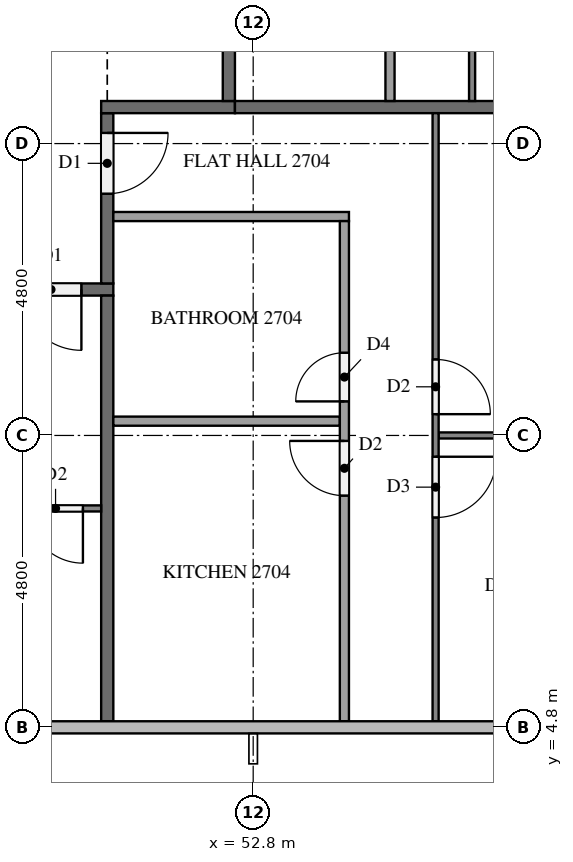
"""IFC4 building model, lengths in metres.
Left out: names, types, materials, properties, quantities, classifications, styles, units other than length and angle.
Written with IfcOpenShell. Run it as: python <this file> out.ifc"""

import sys

from ifc_helpers import new_model, si_unit, direction, frame, frame_2d, origin, place, context, subcontext, project, spatial, rectangle, extrude, element, fill, save


model = new_model("IFC4")
c1 = context("Model", 3, precision=1e-05, world=origin(), true_north=direction((0.0, 1.0)))
c2 = subcontext(c1, "Body", "Model", "MODEL_VIEW")
j1 = project(units=[si_unit("LENGTHUNIT", "METRE"), si_unit("PLANEANGLEUNIT", "RADIAN")], contexts=[c1])
p1 = place(None, origin())
s1 = spatial("IfcSite", under=j1, at=p1, CompositionType="ELEMENT")
p2 = place(p1, origin())
s2 = spatial("IfcBuilding", under=s1, at=p2, CompositionType="ELEMENT")
p3 = place(p2, frame((0.0, 0.0, 106.7)))
s3 = spatial("IfcBuildingStorey", under=s2, at=p3, CompositionType="ELEMENT", Elevation=106.7)
p4 = place(p3, frame((50.5, 12.0, 0.0), z_axis=(0.0, 0.0, 1.0), x_axis=(-1.0, 0.0, 0.0)))
e1 = element("IfcWall", 1, at=p4, inside=s3, PredefinedType="PARTITIONING", context=c2, shape_type="SweptSolid", body=[
    extrude(rectangle(XDim=38.6, YDim=0.2, at=frame_2d((19.3, 0.0))), origin(), (0.0, 0.0, 1.0), 3.2),
])
p5 = place(p4, frame((37.075, 0.0, 0.0)))
e2 = element("IfcOpeningElement", 2, at=p5, cuts=e1, PredefinedType="OPENING", context=c2, shape_type="SweptSolid", body=[
    extrude(rectangle(XDim=1.0, YDim=2.1, at=frame_2d((0.5, 1.05))), frame((0.0, 0.11, 0.0), z_axis=(0.0, -1.0, 0.0), x_axis=(1.0, 0.0, 0.0)), (0.0, 0.0, 1.0), 0.22),
])
p6 = place(p4, frame((22.675, 0.0, 0.0)))
e3 = element("IfcOpeningElement", 3, at=p6, cuts=e1, PredefinedType="OPENING", context=c2, shape_type="SweptSolid", body=[
    extrude(rectangle(XDim=1.0, YDim=2.1, at=frame_2d((0.5, 1.05))), frame((0.0, 0.11, 0.0), z_axis=(0.0, -1.0, 0.0), x_axis=(1.0, 0.0, 0.0)), (0.0, 0.0, 1.0), 0.22),
])
p7 = place(p4, frame((0.525, 0.0, 0.0)))
e4 = element("IfcOpeningElement", 4, at=p7, cuts=e1, PredefinedType="OPENING", context=c2, shape_type="SweptSolid", body=[
    extrude(rectangle(XDim=1.0, YDim=2.1, at=frame_2d((0.5, 1.05))), frame((0.0, 0.11, 0.0), z_axis=(0.0, -1.0, 0.0), x_axis=(1.0, 0.0, 0.0)), (0.0, 0.0, 1.0), 0.22),
])
p8 = place(p3, frame((50.4, 14.9, 0.0), z_axis=(0.0, 0.0, 1.0), x_axis=(0.0, -1.0, 0.0)))
e5 = element("IfcWall", 5, at=p8, inside=s3, PredefinedType="PARTITIONING", context=c2, shape_type="SweptSolid", body=[
    extrude(rectangle(XDim=2.8, YDim=0.2, at=frame_2d((1.4, 0.0))), origin(), (0.0, 0.0, 1.0), 3.2),
])
p9 = place(p8, frame((0.325, 0.0, 0.0)))
e6 = element("IfcOpeningElement", 6, at=p9, cuts=e5, PredefinedType="OPENING", context=c2, shape_type="SweptSolid", body=[
    extrude(rectangle(XDim=1.0, YDim=2.1, at=frame_2d((0.5, 1.05))), frame((0.0, 0.11, 0.0), z_axis=(0.0, -1.0, 0.0), x_axis=(1.0, 0.0, 0.0)), (0.0, 0.0, 1.0), 0.22),
])
p10 = place(p3, frame((50.3, 15.0, 0.0), z_axis=(0.0, 0.0, 1.0), x_axis=(1.0, 0.0, 0.0)))
e7 = element("IfcWall", 7, at=p10, inside=s3, PredefinedType="PARTITIONING", context=c2, shape_type="SweptSolid", body=[
    extrude(rectangle(XDim=2.2, YDim=0.2, at=frame_2d((1.1, 0.0))), origin(), (0.0, 0.0, 1.0), 3.2),
])
p11 = place(p3, frame((52.4, 37.7, 0.0), z_axis=(0.0, 0.0, 1.0), x_axis=(0.0, -1.0, 0.0)))
e8 = element("IfcWall", 8, at=p11, inside=s3, PredefinedType="PARTITIONING", context=c2, shape_type="SweptSolid", body=[
    extrude(rectangle(XDim=22.6, YDim=0.2, at=frame_2d((11.3, 0.0))), origin(), (0.0, 0.0, 1.0), 3.2),
])
p12 = place(p11, frame((6.925, 0.0, 0.0)))
e9 = element("IfcOpeningElement", 9, at=p12, cuts=e8, PredefinedType="OPENING", context=c2, shape_type="SweptSolid", body=[
    extrude(rectangle(XDim=1.0, YDim=2.1, at=frame_2d((0.5, 1.05))), frame((0.0, 0.11, 0.0), z_axis=(0.0, -1.0, 0.0), x_axis=(1.0, 0.0, 0.0)), (0.0, 0.0, 1.0), 0.22),
])
p13 = place(p11, frame((5.075, 0.0, 0.0)))
e10 = element("IfcOpeningElement", 10, at=p13, cuts=e8, PredefinedType="OPENING", context=c2, shape_type="SweptSolid", body=[
    extrude(rectangle(XDim=1.0, YDim=2.1, at=frame_2d((0.5, 1.05))), frame((0.0, 0.11, 0.0), z_axis=(0.0, -1.0, 0.0), x_axis=(1.0, 0.0, 0.0)), (0.0, 0.0, 1.0), 0.22),
])
p14 = place(p3, frame((50.4, 11.9, 0.0), z_axis=(0.0, 0.0, 1.0), x_axis=(0.0, -1.0, 0.0)))
e11 = element("IfcWall", 11, at=p14, inside=s3, PredefinedType="PARTITIONING", context=c2, shape_type="SweptSolid", body=[
    extrude(rectangle(XDim=7.0, YDim=0.2, at=frame_2d((3.5, 0.0))), origin(), (0.0, 0.0, 1.0), 3.2),
])
p15 = place(p3, frame((52.5, 15.0, 0.0), z_axis=(0.0, 0.0, 1.0), x_axis=(1.0, 0.0, 0.0)))
e12 = element("IfcWall", 12, at=p15, inside=s3, PredefinedType="PARTITIONING", context=c2, shape_type="SweptSolid", body=[
    extrude(rectangle(XDim=9.8, YDim=0.2, at=frame_2d((4.9, 0.0))), origin(), (0.0, 0.0, 1.0), 3.2),
])
p16 = place(p3, frame((50.3, 8.4, 0.0), z_axis=(0.0, 0.0, 1.0), x_axis=(-1.0, 0.0, 0.0)))
e13 = element("IfcWall", 13, at=p16, inside=s3, PredefinedType="PARTITIONING", context=c2, shape_type="SweptSolid", body=[
    extrude(rectangle(XDim=9.4, YDim=0.1, at=frame_2d((4.7, 0.0))), origin(), (0.0, 0.0, 1.0), 3.2),
])
p17 = place(p16, frame((0.3, 0.0, 0.0)))
e14 = element("IfcOpeningElement", 14, at=p17, cuts=e13, PredefinedType="OPENING", context=c2, shape_type="SweptSolid", body=[
    extrude(rectangle(XDim=0.9, YDim=2.1, at=frame_2d((0.45, 1.05))), frame((0.0, 0.06, 0.0), z_axis=(0.0, -1.0, 0.0), x_axis=(1.0, 0.0, 0.0)), (0.0, 0.0, 1.0), 0.12),
])
p18 = place(p16, frame((8.1, 0.0, 0.0)))
e15 = element("IfcOpeningElement", 15, at=p18, cuts=e13, PredefinedType="OPENING", context=c2, shape_type="SweptSolid", body=[
    extrude(rectangle(XDim=1.0, YDim=2.1, at=frame_2d((0.5, 1.05))), frame((0.0, 0.06, 0.0), z_axis=(0.0, -1.0, 0.0), x_axis=(1.0, 0.0, 0.0)), (0.0, 0.0, 1.0), 0.12),
])
p19 = place(p3, frame((55.85, 9.6, 0.0), z_axis=(0.0, 0.0, 1.0), x_axis=(1.0, 0.0, 0.0)))
e16 = element("IfcWall", 16, at=p19, inside=s3, PredefinedType="PARTITIONING", context=c2, shape_type="SweptSolid", body=[
    extrude(rectangle(XDim=5.975, YDim=0.1, at=frame_2d((2.987, 0.0))), origin(), (0.0, 0.0, 1.0), 3.2),
])
p20 = place(p3, frame((55.8, 14.9, 0.0), z_axis=(0.0, 0.0, 1.0), x_axis=(0.0, -1.0, 0.0)))
e17 = element("IfcWall", 17, at=p20, inside=s3, PredefinedType="PARTITIONING", context=c2, shape_type="SweptSolid", body=[
    extrude(rectangle(XDim=10.0, YDim=0.1, at=frame_2d((5.0, 0.0))), origin(), (0.0, 0.0, 1.0), 3.2),
])
p21 = place(p20, frame((4.05, 0.0, 0.0)))
e18 = element("IfcOpeningElement", 18, at=p21, cuts=e17, PredefinedType="OPENING", context=c2, shape_type="SweptSolid", body=[
    extrude(rectangle(XDim=0.9, YDim=2.1, at=frame_2d((0.45, 1.05))), frame((0.0, 0.06, 0.0), z_axis=(0.0, -1.0, 0.0), x_axis=(1.0, 0.0, 0.0)), (0.0, 0.0, 1.0), 0.12),
])
p22 = place(p20, frame((5.65, 0.0, 0.0)))
e19 = element("IfcOpeningElement", 19, at=p22, cuts=e17, PredefinedType="OPENING", context=c2, shape_type="SweptSolid", body=[
    extrude(rectangle(XDim=1.0, YDim=2.1, at=frame_2d((0.5, 1.05))), frame((0.0, 0.06, 0.0), z_axis=(0.0, -1.0, 0.0), x_axis=(1.0, 0.0, 0.0)), (0.0, 0.0, 1.0), 0.12),
])
p23 = place(p3, frame((50.5, 9.835, 0.0), z_axis=(0.0, 0.0, 1.0), x_axis=(1.0, 0.0, 0.0)))
e20 = element("IfcWall", 20, at=p23, inside=s3, PredefinedType="PARTITIONING", context=c2, shape_type="SweptSolid", body=[
    extrude(rectangle(XDim=3.725, YDim=0.15, at=frame_2d((1.863, 0.0))), origin(), (0.0, 0.0, 1.0), 3.2),
])
p24 = place(p3, frame((50.5, 13.2, 0.0), z_axis=(0.0, 0.0, 1.0), x_axis=(1.0, 0.0, 0.0)))
e21 = element("IfcWall", 21, at=p24, inside=s3, PredefinedType="PARTITIONING", context=c2, shape_type="SweptSolid", body=[
    extrude(rectangle(XDim=3.875, YDim=0.15, at=frame_2d((1.938, 0.0))), origin(), (0.0, 0.0, 1.0), 3.2),
])
p25 = place(p3, frame((54.3, 4.9, 0.0), z_axis=(0.0, 0.0, 1.0), x_axis=(0.0, 1.0, 0.0)))
e22 = element("IfcWall", 22, at=p25, inside=s3, PredefinedType="PARTITIONING", context=c2, shape_type="SweptSolid", body=[
    extrude(rectangle(XDim=8.225, YDim=0.15, at=frame_2d((4.113, 0.0))), origin(), (0.0, 0.0, 1.0), 3.2),
])
p26 = place(p25, frame((5.26, 0.0, 0.0)))
e23 = element("IfcOpeningElement", 23, at=p26, cuts=e22, PredefinedType="OPENING", context=c2, shape_type="SweptSolid", body=[
    extrude(rectangle(XDim=0.8, YDim=2.1, at=frame_2d((0.4, 1.05))), frame((0.0, 0.085, 0.0), z_axis=(0.0, -1.0, 0.0), x_axis=(1.0, 0.0, 0.0)), (0.0, 0.0, 1.0), 0.17),
])
p27 = place(p25, frame((3.71, 0.0, 0.0)))
e24 = element("IfcOpeningElement", 24, at=p27, cuts=e22, PredefinedType="OPENING", context=c2, shape_type="SweptSolid", body=[
    extrude(rectangle(XDim=0.9, YDim=2.1, at=frame_2d((0.45, 1.05))), frame((0.0, 0.085, 0.0), z_axis=(0.0, -1.0, 0.0), x_axis=(1.0, 0.0, 0.0)), (0.0, 0.0, 1.0), 0.17),
])
p28 = place(p3, frame((56.4, 31.1, 0.0), z_axis=(0.0, 0.0, 1.0), x_axis=(0.0, -1.0, 0.0)))
e25 = element("IfcWall", 25, at=p28, inside=s3, PredefinedType="PARTITIONING", context=c2, shape_type="SweptSolid", body=[
    extrude(rectangle(XDim=16.0, YDim=0.1, at=frame_2d((8.0, 0.0))), origin(), (0.0, 0.0, 1.0), 3.2),
])
p29 = place(p28, frame((0.3, 0.0, 0.0)))
e26 = element("IfcOpeningElement", 26, at=p29, cuts=e25, PredefinedType="OPENING", context=c2, shape_type="SweptSolid", body=[
    extrude(rectangle(XDim=0.9, YDim=2.1, at=frame_2d((0.45, 1.05))), frame((0.0, 0.06, 0.0), z_axis=(0.0, -1.0, 0.0), x_axis=(1.0, 0.0, 0.0)), (0.0, 0.0, 1.0), 0.12),
])
p30 = place(p28, frame((8.25, 0.0, 0.0)))
e27 = element("IfcOpeningElement", 27, at=p30, cuts=e25, PredefinedType="OPENING", context=c2, shape_type="SweptSolid", body=[
    extrude(rectangle(XDim=0.9, YDim=2.1, at=frame_2d((0.45, 1.05))), frame((0.0, 0.06, 0.0), z_axis=(0.0, -1.0, 0.0), x_axis=(1.0, 0.0, 0.0)), (0.0, 0.0, 1.0), 0.12),
])
p31 = place(p28, frame((9.85, 0.0, 0.0)))
e28 = element("IfcOpeningElement", 28, at=p31, cuts=e25, PredefinedType="OPENING", context=c2, shape_type="SweptSolid", body=[
    extrude(rectangle(XDim=1.0, YDim=2.1, at=frame_2d((0.5, 1.05))), frame((0.0, 0.06, 0.0), z_axis=(0.0, -1.0, 0.0), x_axis=(1.0, 0.0, 0.0)), (0.0, 0.0, 1.0), 0.12),
])
p32 = place(p3, frame((55.05, 15.1, 0.0), z_axis=(0.0, 0.0, 1.0), x_axis=(0.0, 1.0, 0.0)))
e29 = element("IfcWall", 29, at=p32, inside=s3, PredefinedType="PARTITIONING", context=c2, shape_type="SweptSolid", body=[
    extrude(rectangle(XDim=14.225, YDim=0.15, at=frame_2d((7.112, 0.0))), origin(), (0.0, 0.0, 1.0), 3.2),
])
p33 = place(p32, frame((13.125, 0.0, 0.0)))
e30 = element("IfcOpeningElement", 30, at=p33, cuts=e29, PredefinedType="OPENING", context=c2, shape_type="SweptSolid", body=[
    extrude(rectangle(XDim=0.8, YDim=2.1, at=frame_2d((0.4, 1.05))), frame((0.0, 0.085, 0.0), z_axis=(0.0, -1.0, 0.0), x_axis=(1.0, 0.0, 0.0)), (0.0, 0.0, 1.0), 0.17),
])
p34 = place(p32, frame((4.702, 0.0, 0.0)))
e31 = element("IfcOpeningElement", 31, at=p34, cuts=e29, PredefinedType="OPENING", context=c2, shape_type="SweptSolid", body=[
    extrude(rectangle(XDim=0.9, YDim=2.1, at=frame_2d((0.45, 1.05))), frame((0.0, 0.085, 0.0), z_axis=(0.0, -1.0, 0.0), x_axis=(1.0, 0.0, 0.0)), (0.0, 0.0, 1.0), 0.17),
])
p35 = place(p32, frame((3.152, 0.0, 0.0)))
e32 = element("IfcOpeningElement", 32, at=p35, cuts=e29, PredefinedType="OPENING", context=c2, shape_type="SweptSolid", body=[
    extrude(rectangle(XDim=0.9, YDim=2.1, at=frame_2d((0.45, 1.05))), frame((0.0, 0.085, 0.0), z_axis=(0.0, -1.0, 0.0), x_axis=(1.0, 0.0, 0.0)), (0.0, 0.0, 1.0), 0.17),
])
p36 = place(p7, origin())
e33 = element("IfcDoor", 33, at=p36, inside=s3, OperationType="SINGLE_SWING_LEFT", PredefinedType="DOOR", context=c2, shape_type="SweptSolid", body=[
    extrude(rectangle(XDim=1.0, YDim=2.1, at=frame_2d((0.5, 1.05))), frame((0.0, 0.025, 0.0), z_axis=(0.0, -1.0, 0.0), x_axis=(1.0, 0.0, 0.0)), (0.0, 0.0, 1.0), 0.05),
])
fill(e4, e33)
p37 = place(p9, origin())
e34 = element("IfcDoor", 34, at=p37, inside=s3, OperationType="SINGLE_SWING_LEFT", PredefinedType="DOOR", context=c2, shape_type="SweptSolid", body=[
    extrude(rectangle(XDim=1.0, YDim=2.1, at=frame_2d((0.5, 1.05))), frame((0.0, 0.025, 0.0), z_axis=(0.0, -1.0, 0.0), x_axis=(1.0, 0.0, 0.0)), (0.0, 0.0, 1.0), 0.05),
])
fill(e6, e34)
p38 = place(p17, origin())
e35 = element("IfcDoor", 35, at=p38, inside=s3, OperationType="SINGLE_SWING_LEFT", PredefinedType="DOOR", context=c2, shape_type="SweptSolid", body=[
    extrude(rectangle(XDim=0.9, YDim=2.1, at=frame_2d((0.45, 1.05))), frame((0.0, 0.025, 0.0), z_axis=(0.0, -1.0, 0.0), x_axis=(1.0, 0.0, 0.0)), (0.0, 0.0, 1.0), 0.05),
])
fill(e14, e35)
p39 = place(p21, origin())
e36 = element("IfcDoor", 36, at=p39, inside=s3, OperationType="SINGLE_SWING_RIGHT", PredefinedType="DOOR", context=c2, shape_type="SweptSolid", body=[
    extrude(rectangle(XDim=0.9, YDim=2.1, at=frame_2d((0.45, 1.05))), frame((0.0, 0.025, 0.0), z_axis=(0.0, -1.0, 0.0), x_axis=(1.0, 0.0, 0.0)), (0.0, 0.0, 1.0), 0.05),
])
fill(e18, e36)
p40 = place(p22, origin())
e37 = element("IfcDoor", 37, at=p40, inside=s3, OperationType="SINGLE_SWING_LEFT", PredefinedType="DOOR", context=c2, shape_type="SweptSolid", body=[
    extrude(rectangle(XDim=1.0, YDim=2.1, at=frame_2d((0.5, 1.05))), frame((0.0, 0.025, 0.0), z_axis=(0.0, -1.0, 0.0), x_axis=(1.0, 0.0, 0.0)), (0.0, 0.0, 1.0), 0.05),
])
fill(e19, e37)
p41 = place(p26, origin())
e38 = element("IfcDoor", 38, at=p41, inside=s3, OperationType="SINGLE_SWING_LEFT", PredefinedType="DOOR", context=c2, shape_type="SweptSolid", body=[
    extrude(rectangle(XDim=0.8, YDim=2.1, at=frame_2d((0.4, 1.05))), frame((0.0, 0.025, 0.0), z_axis=(0.0, -1.0, 0.0), x_axis=(1.0, 0.0, 0.0)), (0.0, 0.0, 1.0), 0.05),
])
fill(e23, e38)
p42 = place(p27, origin())
e39 = element("IfcDoor", 39, at=p42, inside=s3, OperationType="SINGLE_SWING_RIGHT", PredefinedType="DOOR", context=c2, shape_type="SweptSolid", body=[
    extrude(rectangle(XDim=0.9, YDim=2.1, at=frame_2d((0.45, 1.05))), frame((0.0, 0.025, 0.0), z_axis=(0.0, -1.0, 0.0), x_axis=(1.0, 0.0, 0.0)), (0.0, 0.0, 1.0), 0.05),
])
fill(e24, e39)
save(model, sys.argv[1])
